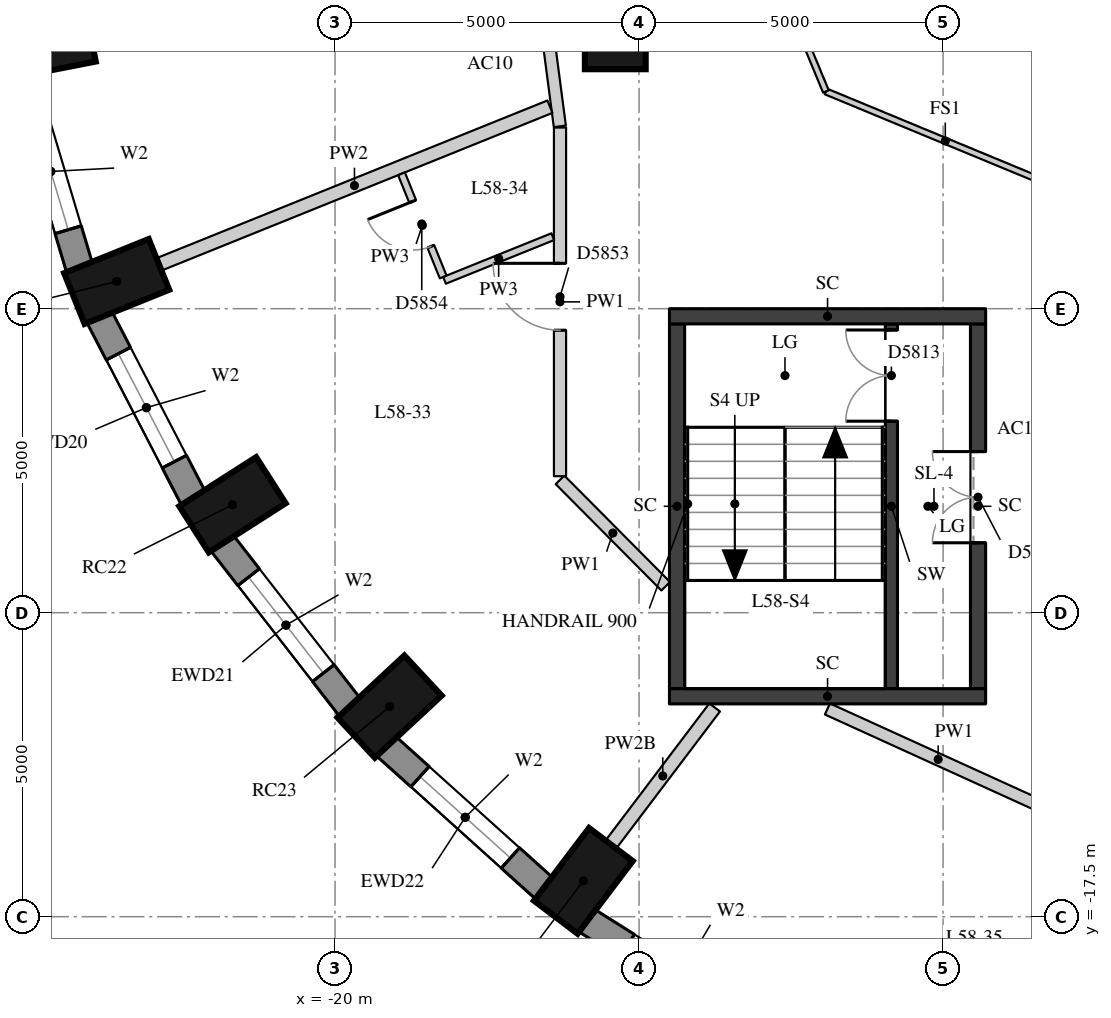
"""IFC4 building model, lengths in metres.
Left out: names, types, materials, properties, quantities, classifications, styles, units other than length and angle.
Written with IfcOpenShell. Run it as: python <this file> out.ifc"""

import sys

from ifc_helpers import new_model, si_unit, direction, frame, frame_2d, origin, origin_2d, place, context, subcontext, project, spatial, rectangle, extrude, element, fill, save


model = new_model("IFC4")
c1 = context("Model", 3, precision=1e-05, world=origin(), true_north=direction((0.0, 1.0)))
c2 = subcontext(c1, "Body", "Model", "MODEL_VIEW")
j1 = project(units=[si_unit("LENGTHUNIT", "METRE"), si_unit("PLANEANGLEUNIT", "RADIAN")], contexts=[c1])
p1 = place(None, origin())
s1 = spatial("IfcSite", under=j1, at=p1, CompositionType="ELEMENT")
p2 = place(p1, origin())
s2 = spatial("IfcBuilding", under=s1, at=p2, CompositionType="ELEMENT")
p3 = place(p2, frame((0.0, 0.0, 205.7)))
s3 = spatial("IfcBuildingStorey", under=s2, at=p3, CompositionType="ELEMENT", Elevation=205.7)
for number, where, z_axis, x_axis in (
    (1, (-24.757, -3.137, 0.0), (0.0, 0.0, 1.0), (-0.981, -0.192, 0.0)),
    (2, (-23.591, -7.052, 0.0), (0.0, 0.0, 1.0), (-0.927, -0.374, 0.0)),
    (3, (-21.687, -10.725, 0.0), (0.0, 0.0, 1.0), (-0.842, -0.539, 0.0)),
    (4, (-19.102, -14.045, 0.0), (0.0, 0.0, 1.0), (-0.732, -0.681, 0.0)),
    (5, (-15.916, -16.911, 0.0), (0.0, 0.0, 1.0), (-0.604, -0.797, 0.0)),
):
    element("IfcColumn", number, at=place(p3, frame(where, z_axis=z_axis, x_axis=x_axis)), inside=s3, PredefinedType="COLUMN", context=c2, shape_type="SweptSolid", body=[
        extrude(rectangle(XDim=1.5, YDim=0.9, at=origin_2d()), origin(), (0.0, 0.0, 1.0), 3.3),
    ])
p4 = place(p3, frame((-15.391, -3.062, 0.0), z_axis=(0.0, 0.0, 1.0), x_axis=(1.0, 0.0, 0.0)))
e6 = element("IfcColumn", 6, at=p4, inside=s3, PredefinedType="COLUMN", context=c2, shape_type="SweptSolid", body=[
    extrude(rectangle(XDim=1.0, YDim=1.0, at=origin_2d()), origin(), (0.0, 0.0, 1.0), 3.3),
])
p5 = place(p3, frame((-25.148, -3.652, 0.0), z_axis=(0.0, 0.0, 1.0), x_axis=(0.285444972963, -0.958395099847, 0.0)))
e7 = element("IfcWall", 7, at=p5, inside=s3, PredefinedType="SOLIDWALL", context=c2, shape_type="SweptSolid", body=[
    extrude(rectangle(XDim=3.32, YDim=0.45, at=frame_2d((1.66, 0.0))), origin(), (0.0, 0.0, 1.0), 3.02),
])
p6 = place(p5, frame((0.66, 0.0, 0.4)))
e8 = element("IfcOpeningElement", 8, at=p6, cuts=e7, PredefinedType="OPENING", context=c2, shape_type="SweptSolid", body=[
    extrude(rectangle(XDim=2.0, YDim=1.75, at=frame_2d((1.0, 0.875))), frame((0.0, 0.235, 0.0), z_axis=(0.0, -1.0, 0.0), x_axis=(1.0, 0.0, 0.0)), (0.0, 0.0, 1.0), 0.47),
])
p7 = place(p3, frame((-23.878, -7.632, 0.0), z_axis=(0.0, 0.0, 1.0), x_axis=(0.460232593174, -0.887798378113, 0.0)))
e9 = element("IfcWall", 9, at=p7, inside=s3, PredefinedType="SOLIDWALL", context=c2, shape_type="SweptSolid", body=[
    extrude(rectangle(XDim=3.371, YDim=0.45, at=frame_2d((1.685, 0.0))), origin(), (0.0, 0.0, 1.0), 3.02),
])
p8 = place(p7, frame((0.685, 0.0, 0.4)))
e10 = element("IfcOpeningElement", 10, at=p8, cuts=e9, PredefinedType="OPENING", context=c2, shape_type="SweptSolid", body=[
    extrude(rectangle(XDim=2.0, YDim=1.75, at=frame_2d((1.0, 0.875))), frame((0.0, 0.235, 0.0), z_axis=(0.0, -1.0, 0.0), x_axis=(1.0, 0.0, 0.0)), (0.0, 0.0, 1.0), 0.47),
])
p9 = place(p3, frame((-21.863, -11.348, 0.0), z_axis=(0.0, 0.0, 1.0), x_axis=(0.614255239631, -0.789107407509, 0.0)))
e11 = element("IfcWall", 11, at=p9, inside=s3, PredefinedType="SOLIDWALL", context=c2, shape_type="SweptSolid", body=[
    extrude(rectangle(XDim=3.438, YDim=0.45, at=frame_2d((1.719, 0.0))), origin(), (0.0, 0.0, 1.0), 3.02),
])
p10 = place(p9, frame((0.719, 0.0, 0.4)))
e12 = element("IfcOpeningElement", 12, at=p10, cuts=e11, PredefinedType="OPENING", context=c2, shape_type="SweptSolid", body=[
    extrude(rectangle(XDim=2.0, YDim=1.75, at=frame_2d((1.0, 0.875))), frame((0.0, 0.235, 0.0), z_axis=(0.0, -1.0, 0.0), x_axis=(1.0, 0.0, 0.0)), (0.0, 0.0, 1.0), 0.47),
])
p11 = place(p3, frame((-19.165, -14.69, 0.0), z_axis=(0.0, 0.0, 1.0), x_axis=(0.743442727602, -0.668799604348, 0.0)))
e13 = element("IfcWall", 13, at=p11, inside=s3, PredefinedType="SOLIDWALL", context=c2, shape_type="SweptSolid", body=[
    extrude(rectangle(XDim=3.513, YDim=0.45, at=frame_2d((1.756, 0.0))), origin(), (0.0, 0.0, 1.0), 3.02),
])
p12 = place(p11, frame((0.756, 0.0, 0.4)))
e14 = element("IfcOpeningElement", 14, at=p12, cuts=e13, PredefinedType="OPENING", context=c2, shape_type="SweptSolid", body=[
    extrude(rectangle(XDim=2.0, YDim=1.75, at=frame_2d((1.0, 0.875))), frame((0.0, 0.235, 0.0), z_axis=(0.0, -1.0, 0.0), x_axis=(1.0, 0.0, 0.0)), (0.0, 0.0, 1.0), 0.47),
])
p13 = place(p3, frame((-15.867, -17.559, 0.0), z_axis=(0.0, 0.0, 1.0), x_axis=(0.84616917791, -0.532914366813, 0.0)))
e15 = element("IfcWall", 15, at=p13, inside=s3, PredefinedType="SOLIDWALL", context=c2, shape_type="SweptSolid", body=[
    extrude(rectangle(XDim=3.587, YDim=0.45, at=frame_2d((1.793, 0.0))), origin(), (0.0, 0.0, 1.0), 3.02),
])
p14 = place(p13, frame((0.793, 0.0, 0.4)))
e16 = element("IfcOpeningElement", 16, at=p14, cuts=e15, PredefinedType="OPENING", context=c2, shape_type="SweptSolid", body=[
    extrude(rectangle(XDim=2.0, YDim=1.75, at=frame_2d((1.0, 0.875))), frame((0.0, 0.235, 0.0), z_axis=(0.0, -1.0, 0.0), x_axis=(1.0, 0.0, 0.0)), (0.0, 0.0, 1.0), 0.47),
])
p15 = place(p3, frame((-10.85, -13.75, 0.0), z_axis=(0.0, 0.0, 1.0), x_axis=(0.0, 1.0, 0.0)))
e17 = element("IfcWall", 17, at=p15, inside=s3, PredefinedType="SHEAR", context=c2, shape_type="SweptSolid", body=[
    extrude(rectangle(XDim=6.0, YDim=0.2, at=frame_2d((3.0, 0.0))), origin(), (0.0, 0.0, 1.0), 3.02),
])
p16 = place(p15, frame((4.4, 0.0, 0.0)))
e18 = element("IfcOpeningElement", 18, at=p16, cuts=e17, PredefinedType="OPENING", context=c2, shape_type="SweptSolid", body=[
    extrude(rectangle(XDim=1.5, YDim=2.1, at=frame_2d((0.75, 1.05))), frame((0.0, 0.11, 0.0), z_axis=(0.0, -1.0, 0.0), x_axis=(1.0, 0.0, 0.0)), (0.0, 0.0, 1.0), 0.22),
])
p17 = place(p3, frame((-14.375, -13.75, -0.28), z_axis=(0.0, 0.0, 1.0), x_axis=(0.0, 1.0, 0.0)))
e19 = element("IfcWall", 19, at=p17, inside=s3, PredefinedType="SHEAR", context=c2, shape_type="SweptSolid", body=[
    extrude(rectangle(XDim=6.0, YDim=0.25, at=frame_2d((3.0, 0.0))), origin(), (0.0, 0.0, 1.0), 3.3),
])
p18 = place(p3, frame((-9.425, -13.75, -0.28), z_axis=(0.0, 0.0, 1.0), x_axis=(0.0, 1.0, 0.0)))
e20 = element("IfcWall", 20, at=p18, inside=s3, PredefinedType="SHEAR", context=c2, shape_type="SweptSolid", body=[
    extrude(rectangle(XDim=6.0, YDim=0.25, at=frame_2d((3.0, 0.0))), origin(), (0.0, 0.0, 1.0), 3.3),
])
p19 = place(p18, frame((2.4, 0.0, 0.28)))
e21 = element("IfcOpeningElement", 21, at=p19, cuts=e20, PredefinedType="OPENING", context=c2, shape_type="SweptSolid", body=[
    extrude(rectangle(XDim=1.5, YDim=2.1, at=frame_2d((0.75, 1.05))), frame((0.0, 0.135, 0.0), z_axis=(0.0, -1.0, 0.0), x_axis=(1.0, 0.0, 0.0)), (0.0, 0.0, 1.0), 0.27),
])
for number, where, z_axis, x_axis in (
    (22, (-14.5, -7.625, -0.28), (0.0, 0.0, 1.0), (1.0, 0.0, 0.0)),
    (23, (-14.5, -13.875, -0.28), (0.0, 0.0, 1.0), (1.0, 0.0, 0.0)),
):
    element("IfcWall", number, at=place(p3, frame(where, z_axis=z_axis, x_axis=x_axis)), inside=s3, PredefinedType="SHEAR", context=c2, shape_type="SweptSolid", body=[
        extrude(rectangle(XDim=5.2, YDim=0.25, at=frame_2d((2.6, 0.0))), origin(), (0.0, 0.0, 1.0), 3.3),
    ])
p20 = place(p3, frame((-8.26, -15.742, 0.0), z_axis=(0.0, 0.0, 1.0), x_axis=(-0.910075871217, 0.414441683025, 0.0)))
e24 = element("IfcWall", 24, at=p20, inside=s3, PredefinedType="PARTITIONING", context=c2, shape_type="SweptSolid", body=[
    extrude(rectangle(XDim=4.002, YDim=0.2, at=frame_2d((2.001, 0.0))), origin(), (0.0, 0.0, 1.0), 3.02),
])
p21 = place(p3, frame((-14.562, -12.064, 0.0), z_axis=(0.0, 0.0, 1.0), x_axis=(-0.704826289083, 0.709379942074, 0.0)))
e25 = element("IfcWall", 25, at=p21, inside=s3, PredefinedType="PARTITIONING", context=c2, shape_type="SweptSolid", body=[
    extrude(rectangle(XDim=2.466, YDim=0.2, at=frame_2d((1.233, 0.0))), origin(), (0.0, 0.0, 1.0), 3.02),
])
p22 = place(p3, frame((-16.3, -10.255, 0.0), z_axis=(0.0, 0.0, 1.0), x_axis=(0.0, 1.0, 0.0)))
e26 = element("IfcWall", 26, at=p22, inside=s3, PredefinedType="PARTITIONING", context=c2, shape_type="SweptSolid", body=[
    extrude(rectangle(XDim=5.734, YDim=0.2, at=frame_2d((2.867, 0.0))), origin(), (0.0, 0.0, 1.0), 3.02),
])
p23 = place(p22, frame((2.401, 0.0, 0.0)))
e27 = element("IfcOpeningElement", 27, at=p23, cuts=e26, PredefinedType="OPENING", context=c2, shape_type="SweptSolid", body=[
    extrude(rectangle(XDim=1.1, YDim=2.1, at=frame_2d((0.55, 1.05))), frame((0.0, 0.11, 0.0), z_axis=(0.0, -1.0, 0.0), x_axis=(1.0, 0.0, 0.0)), (0.0, 0.0, 1.0), 0.22),
])
p24 = place(p3, frame((-16.303, -4.501, 0.0), z_axis=(0.0, 0.0, 1.0), x_axis=(-0.130191522351, 0.991488864036, 0.0)))
e28 = element("IfcWall", 28, at=p24, inside=s3, PredefinedType="PARTITIONING", context=c2, shape_type="SweptSolid", body=[
    extrude(rectangle(XDim=8.045, YDim=0.2, at=frame_2d((4.022, 0.0))), origin(), (0.0, 0.0, 1.0), 3.02),
])
p25 = place(p24, frame((2.738, 0.0, 0.0)))
e29 = element("IfcOpeningElement", 29, at=p25, cuts=e28, PredefinedType="OPENING", context=c2, shape_type="SweptSolid", body=[
    extrude(rectangle(XDim=0.9, YDim=2.1, at=frame_2d((0.45, 1.05))), frame((0.0, 0.11, 0.0), z_axis=(0.0, -1.0, 0.0), x_axis=(1.0, 0.0, 0.0)), (0.0, 0.0, 1.0), 0.22),
])
p26 = place(p3, frame((-22.896, -6.771, 0.0), z_axis=(0.0, 0.0, 1.0), x_axis=(0.927377440276, 0.374127095073, 0.0)))
e30 = element("IfcWall", 30, at=p26, inside=s3, PredefinedType="PARTITIONING", context=c2, shape_type="SweptSolid", body=[
    extrude(rectangle(XDim=6.933, YDim=0.22, at=frame_2d((3.467, 0.0))), origin(), (0.0, 0.0, 1.0), 3.02),
])
p27 = place(p3, frame((-15.463, -16.312, 0.0), z_axis=(0.0, 0.0, 1.0), x_axis=(0.603613294085, 0.797277236101, 0.0)))
e31 = element("IfcWall", 31, at=p27, inside=s3, PredefinedType="PARTITIONING", context=c2, shape_type="SweptSolid", body=[
    extrude(rectangle(XDim=2.828, YDim=0.22, at=frame_2d((1.414, 0.0))), origin(), (0.0, 0.0, 1.0), 2.57),
])
p28 = place(p3, frame((-16.419, -6.315, 0.0), z_axis=(0.0, 0.0, 1.0), x_axis=(-0.927358946461, -0.374172933841, 0.0)))
e32 = element("IfcWall", 32, at=p28, inside=s3, PredefinedType="PARTITIONING", context=c2, shape_type="SweptSolid", body=[
    extrude(rectangle(XDim=1.92, YDim=0.12, at=frame_2d((0.96, 0.0))), origin(), (0.0, 0.0, 1.0), 3.02),
])
p29 = place(p3, frame((-18.222, -6.978, 0.0), z_axis=(0.0, 0.0, 1.0), x_axis=(-0.374218187905, 0.927340685963, 0.0)))
e33 = element("IfcWall", 33, at=p29, inside=s3, PredefinedType="PARTITIONING", context=c2, shape_type="SweptSolid", body=[
    extrude(rectangle(XDim=1.83, YDim=0.12, at=frame_2d((0.915, 0.0))), origin(), (0.0, 0.0, 1.0), 3.02),
])
p30 = place(p29, frame((0.54, 0.0, 0.0)))
e34 = element("IfcOpeningElement", 34, at=p30, cuts=e33, PredefinedType="OPENING", context=c2, shape_type="SweptSolid", body=[
    extrude(rectangle(XDim=0.8, YDim=2.1, at=frame_2d((0.4, 1.05))), frame((0.0, 0.07, 0.0), z_axis=(0.0, -1.0, 0.0), x_axis=(1.0, 0.0, 0.0)), (0.0, 0.0, 1.0), 0.14),
])
for number, where, z_axis, x_axis in (
    (35, (-8.0, -5.554, 0.0), (0.0, 0.0, 1.0), (-0.924, 0.383, 0.0)),
    (36, (-11.927, -3.927, 0.0), (0.0, 0.0, 1.0), (-0.383, 0.924, 0.0)),
):
    element("IfcWall", number, at=place(p3, frame(where, z_axis=z_axis, x_axis=x_axis)), inside=s3, PredefinedType="PARTITIONING", context=c2, shape_type="SweptSolid", body=[
        extrude(rectangle(XDim=4.251, YDim=0.1, at=frame_2d((2.125, 0.0))), origin(), (0.0, 0.0, 1.0), 3.02),
    ])
p31 = place(p6, origin())
e37 = element("IfcWindow", 37, at=p31, inside=s3, PartitioningType="SINGLE_PANEL", PredefinedType="WINDOW", context=c2, shape_type="SweptSolid", body=[
    extrude(rectangle(XDim=2.0, YDim=1.75, at=frame_2d((1.0, 0.875))), frame((0.0, 0.035, 0.0), z_axis=(0.0, -1.0, 0.0), x_axis=(1.0, 0.0, 0.0)), (0.0, 0.0, 1.0), 0.06),
])
fill(e8, e37)
p32 = place(p8, origin())
e38 = element("IfcWindow", 38, at=p32, inside=s3, PartitioningType="SINGLE_PANEL", PredefinedType="WINDOW", context=c2, shape_type="SweptSolid", body=[
    extrude(rectangle(XDim=2.0, YDim=1.75, at=frame_2d((1.0, 0.875))), frame((0.0, 0.035, 0.0), z_axis=(0.0, -1.0, 0.0), x_axis=(1.0, 0.0, 0.0)), (0.0, 0.0, 1.0), 0.06),
])
fill(e10, e38)
p33 = place(p10, origin())
e39 = element("IfcWindow", 39, at=p33, inside=s3, PartitioningType="SINGLE_PANEL", PredefinedType="WINDOW", context=c2, shape_type="SweptSolid", body=[
    extrude(rectangle(XDim=2.0, YDim=1.75, at=frame_2d((1.0, 0.875))), frame((0.0, 0.035, 0.0), z_axis=(0.0, -1.0, 0.0), x_axis=(1.0, 0.0, 0.0)), (0.0, 0.0, 1.0), 0.06),
])
fill(e12, e39)
p34 = place(p12, origin())
e40 = element("IfcWindow", 40, at=p34, inside=s3, PartitioningType="SINGLE_PANEL", PredefinedType="WINDOW", context=c2, shape_type="SweptSolid", body=[
    extrude(rectangle(XDim=2.0, YDim=1.75, at=frame_2d((1.0, 0.875))), frame((0.0, 0.035, 0.0), z_axis=(0.0, -1.0, 0.0), x_axis=(1.0, 0.0, 0.0)), (0.0, 0.0, 1.0), 0.06),
])
fill(e14, e40)
p35 = place(p16, origin())
e41 = element("IfcDoor", 41, at=p35, inside=s3, OperationType="DOUBLE_DOOR_SINGLE_SWING", PredefinedType="DOOR", context=c2, shape_type="SweptSolid", body=[
    extrude(rectangle(XDim=1.5, YDim=2.1, at=frame_2d((0.75, 1.05))), frame((0.0, 0.025, 0.0), z_axis=(0.0, -1.0, 0.0), x_axis=(1.0, 0.0, 0.0)), (0.0, 0.0, 1.0), 0.05),
])
fill(e18, e41)
p36 = place(p19, origin())
e42 = element("IfcDoor", 42, at=p36, inside=s3, OperationType="DOUBLE_DOOR_SINGLE_SWING", PredefinedType="DOOR", context=c2, shape_type="SweptSolid", body=[
    extrude(rectangle(XDim=1.5, YDim=2.1, at=frame_2d((0.75, 1.05))), frame((0.0, 0.025, 0.0), z_axis=(0.0, -1.0, 0.0), x_axis=(1.0, 0.0, 0.0)), (0.0, 0.0, 1.0), 0.05),
])
fill(e21, e42)
p37 = place(p23, origin())
e43 = element("IfcDoor", 43, at=p37, inside=s3, OperationType="SINGLE_SWING_RIGHT", PredefinedType="DOOR", context=c2, shape_type="SweptSolid", body=[
    extrude(rectangle(XDim=1.1, YDim=2.1, at=frame_2d((0.55, 1.05))), frame((0.0, 0.025, 0.0), z_axis=(0.0, -1.0, 0.0), x_axis=(1.0, 0.0, 0.0)), (0.0, 0.0, 1.0), 0.05),
])
fill(e27, e43)
p38 = place(p30, origin())
e44 = element("IfcDoor", 44, at=p38, inside=s3, OperationType="SINGLE_SWING_RIGHT", PredefinedType="DOOR", context=c2, shape_type="SweptSolid", body=[
    extrude(rectangle(XDim=0.8, YDim=2.1, at=frame_2d((0.4, 1.05))), frame((0.0, 0.025, 0.0), z_axis=(0.0, -1.0, 0.0), x_axis=(1.0, 0.0, 0.0)), (0.0, 0.0, 1.0), 0.05),
])
fill(e34, e44)
save(model, sys.argv[1])
